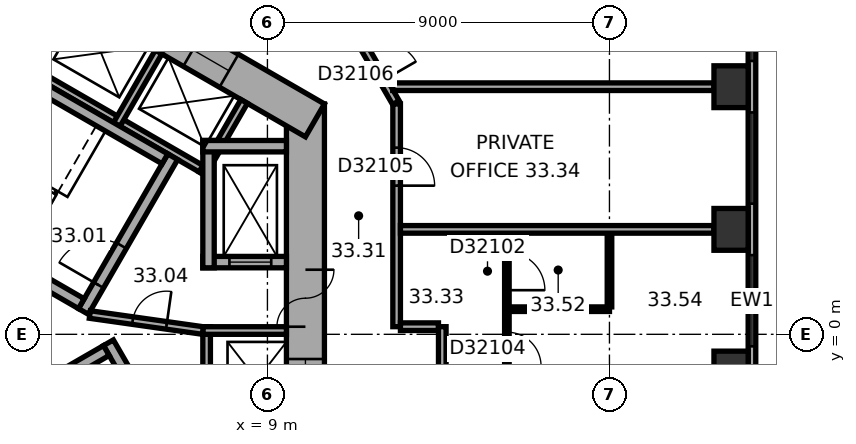
"""IFC4 building model, lengths in metres.
Left out: names, types, materials, properties, quantities, classifications, styles, units other than length and angle.
Written with IfcOpenShell. Run it as: python <this file> out.ifc"""

import sys

from ifc_helpers import new_model, si_unit, direction, frame, frame_2d, origin, origin_2d, place, context, subcontext, project, spatial, rectangle, extrude, element, fill, save


model = new_model("IFC4")
c1 = context("Model", 3, precision=1e-05, world=origin(), true_north=direction((0.0, 1.0)))
c2 = subcontext(c1, "Body", "Model", "MODEL_VIEW")
j1 = project(units=[si_unit("LENGTHUNIT", "METRE"), si_unit("PLANEANGLEUNIT", "RADIAN")], contexts=[c1])
p1 = place(None, origin())
s1 = spatial("IfcSite", under=j1, at=p1, CompositionType="ELEMENT")
p2 = place(p1, origin())
s2 = spatial("IfcBuilding", under=s1, at=p2, CompositionType="ELEMENT")
p3 = place(p2, frame((0.0, 0.0, 135.5)))
s3 = spatial("IfcBuildingStorey", under=s2, at=p3, CompositionType="ELEMENT", Elevation=135.5)
for number, where, z_axis, x_axis in (
    (1, (21.2, -0.993, 0.0), (0.0, 0.0, 1.0), (0.0, 1.0, 0.0)),
    (2, (21.2, 2.761, 0.0), (0.0, 0.0, 1.0), (0.0, 1.0, 0.0)),
    (3, (21.2, 6.515, 0.0), (0.0, 0.0, 1.0), (0.0, 1.0, 0.0)),
):
    element("IfcColumn", number, at=place(p3, frame(where, z_axis=z_axis, x_axis=x_axis)), inside=s3, PredefinedType="COLUMN", context=c2, shape_type="SweptSolid", body=[
        extrude(rectangle(XDim=1.1, YDim=0.9, at=origin_2d()), origin(), (0.0, 0.0, 1.0), 3.7),
    ])
p4 = place(p3, frame((10.0, -6.062, 0.0), z_axis=(0.0, 0.0, 1.0), x_axis=(0.0, 1.0, 0.0)))
e4 = element("IfcWall", 4, at=p4, inside=s3, PredefinedType="SHEAR", context=c2, shape_type="SweptSolid", body=[
    extrude(rectangle(XDim=12.125, YDim=1.0, at=frame_2d((6.062, 0.0))), origin(), (0.0, 0.0, 1.0), 3.7),
])
p5 = place(p4, frame((6.262, 0.0, 0.0)))
e5 = element("IfcOpeningElement", 5, at=p5, cuts=e4, PredefinedType="OPENING", context=c2, shape_type="SweptSolid", body=[
    extrude(rectangle(XDim=1.5, YDim=2.1, at=frame_2d((0.75, 1.05))), frame((0.0, 0.51, 0.0), z_axis=(0.0, -1.0, 0.0), x_axis=(1.0, 0.0, 0.0)), (0.0, 0.0, 1.0), 1.02),
])
p6 = place(p4, frame((1.712, 0.0, 0.0)))
e6 = element("IfcOpeningElement", 6, at=p6, cuts=e4, PredefinedType="OPENING", context=c2, shape_type="SweptSolid", body=[
    extrude(rectangle(XDim=1.1, YDim=2.1, at=frame_2d((0.55, 1.05))), frame((0.0, 0.51, 0.0), z_axis=(0.0, -1.0, 0.0), x_axis=(1.0, 0.0, 0.0)), (0.0, 0.0, 1.0), 1.02),
])
p7 = place(p4, frame((4.312, 0.0, 0.0)))
e7 = element("IfcOpeningElement", 7, at=p7, cuts=e4, PredefinedType="OPENING", context=c2, shape_type="SweptSolid", body=[
    extrude(rectangle(XDim=1.1, YDim=2.1, at=frame_2d((0.55, 1.05))), frame((0.0, 0.51, 0.0), z_axis=(0.0, -1.0, 0.0), x_axis=(1.0, 0.0, 0.0)), (0.0, 0.0, 1.0), 1.02),
])
p8 = place(p3, frame((10.25, 5.629, 0.0), z_axis=(0.0, 0.0, 1.0), x_axis=(-0.866022616891, 0.50000482701, 0.0)))
e8 = element("IfcWall", 8, at=p8, inside=s3, PredefinedType="SHEAR", context=c2, shape_type="SweptSolid", body=[
    extrude(rectangle(XDim=12.125, YDim=1.0, at=frame_2d((6.062, 0.0))), origin(), (0.0, 0.0, 1.0), 3.7),
])
p9 = place(p8, frame((2.612, 0.0, 0.0)))
e9 = element("IfcOpeningElement", 9, at=p9, cuts=e8, PredefinedType="OPENING", context=c2, shape_type="SweptSolid", body=[
    extrude(rectangle(XDim=1.1, YDim=2.1, at=frame_2d((0.55, 1.05))), frame((0.0, 0.51, 0.0), z_axis=(0.0, -1.0, 0.0), x_axis=(1.0, 0.0, 0.0)), (0.0, 0.0, 1.0), 1.02),
])
p10 = place(p8, frame((5.212, 0.0, 0.0)))
e10 = element("IfcOpeningElement", 10, at=p10, cuts=e8, PredefinedType="OPENING", context=c2, shape_type="SweptSolid", body=[
    extrude(rectangle(XDim=1.1, YDim=2.1, at=frame_2d((0.55, 1.05))), frame((0.0, 0.51, 0.0), z_axis=(0.0, -1.0, 0.0), x_axis=(1.0, 0.0, 0.0)), (0.0, 0.0, 1.0), 1.02),
])
p11 = place(p8, frame((7.812, 0.0, 0.0)))
e11 = element("IfcOpeningElement", 11, at=p11, cuts=e8, PredefinedType="OPENING", context=c2, shape_type="SweptSolid", body=[
    extrude(rectangle(XDim=1.1, YDim=2.1, at=frame_2d((0.55, 1.05))), frame((0.0, 0.51, 0.0), z_axis=(0.0, -1.0, 0.0), x_axis=(1.0, 0.0, 0.0)), (0.0, 0.0, 1.0), 1.02),
])
p12 = place(p3, frame((21.75, -9.138, 0.0), z_axis=(0.0, 0.0, 1.0), x_axis=(0.0, 1.0, 0.0)))
e12 = element("IfcWall", 12, at=p12, inside=s3, PredefinedType="STANDARD", context=c2, shape_type="SweptSolid", body=[
    extrude(rectangle(XDim=20.044, YDim=0.2, at=frame_2d((10.022, 0.0))), origin(), (0.0, 0.0, 1.0), 3.7),
])
p13 = place(p12, frame((1.314, 0.0, 0.9)))
e13 = element("IfcOpeningElement", 13, at=p13, cuts=e12, PredefinedType="OPENING", context=c2, shape_type="SweptSolid", body=[
    extrude(rectangle(XDim=2.4, YDim=2.0, at=frame_2d((1.2, 1.0))), frame((0.0, 0.11, 0.0), z_axis=(0.0, -1.0, 0.0), x_axis=(1.0, 0.0, 0.0)), (0.0, 0.0, 1.0), 0.22),
])
p14 = place(p12, frame((5.069, 0.0, 0.9)))
e14 = element("IfcOpeningElement", 14, at=p14, cuts=e12, PredefinedType="OPENING", context=c2, shape_type="SweptSolid", body=[
    extrude(rectangle(XDim=2.4, YDim=2.0, at=frame_2d((1.2, 1.0))), frame((0.0, 0.11, 0.0), z_axis=(0.0, -1.0, 0.0), x_axis=(1.0, 0.0, 0.0)), (0.0, 0.0, 1.0), 0.22),
])
p15 = place(p12, frame((8.823, 0.0, 0.9)))
e15 = element("IfcOpeningElement", 15, at=p15, cuts=e12, PredefinedType="OPENING", context=c2, shape_type="SweptSolid", body=[
    extrude(rectangle(XDim=2.4, YDim=2.0, at=frame_2d((1.2, 1.0))), frame((0.0, 0.11, 0.0), z_axis=(0.0, -1.0, 0.0), x_axis=(1.0, 0.0, 0.0)), (0.0, 0.0, 1.0), 0.22),
])
p16 = place(p12, frame((12.577, 0.0, 0.9)))
e16 = element("IfcOpeningElement", 16, at=p16, cuts=e12, PredefinedType="OPENING", context=c2, shape_type="SweptSolid", body=[
    extrude(rectangle(XDim=2.4, YDim=2.0, at=frame_2d((1.2, 1.0))), frame((0.0, 0.11, 0.0), z_axis=(0.0, -1.0, 0.0), x_axis=(1.0, 0.0, 0.0)), (0.0, 0.0, 1.0), 0.22),
])
p17 = place(p12, frame((16.331, 0.0, 0.9)))
e17 = element("IfcOpeningElement", 17, at=p17, cuts=e12, PredefinedType="OPENING", context=c2, shape_type="SweptSolid", body=[
    extrude(rectangle(XDim=2.4, YDim=2.0, at=frame_2d((1.2, 1.0))), frame((0.0, 0.11, 0.0), z_axis=(0.0, -1.0, 0.0), x_axis=(1.0, 0.0, 0.0)), (0.0, 0.0, 1.0), 0.22),
])
p18 = place(p3, frame((7.4, -5.2, 0.0), z_axis=(0.0, 0.0, 1.0), x_axis=(0.0, 1.0, 0.0)))
e18 = element("IfcWall", 18, at=p18, inside=s3, PredefinedType="PARTITIONING", context=c2, shape_type="SweptSolid", body=[
    extrude(rectangle(XDim=5.4, YDim=0.2, at=frame_2d((2.7, 0.0))), origin(), (0.0, 0.0, 1.0), 3.35),
])
p19 = place(p3, frame((7.3, 0.1, 0.0), z_axis=(0.0, 0.0, 1.0), x_axis=(1.0, 0.0, 0.0)))
e19 = element("IfcWall", 19, at=p19, inside=s3, PredefinedType="PARTITIONING", context=c2, shape_type="SweptSolid", body=[
    extrude(rectangle(XDim=2.2, YDim=0.2, at=frame_2d((1.1, 0.0))), origin(), (0.0, 0.0, 1.0), 3.35),
])
p20 = place(p3, frame((7.424, 4.259, 0.0), z_axis=(0.0, 0.0, 1.0), x_axis=(-0.866026010844, 0.49999894854, 0.0)))
e20 = element("IfcWall", 20, at=p20, inside=s3, PredefinedType="PARTITIONING", context=c2, shape_type="SweptSolid", body=[
    extrude(rectangle(XDim=8.0, YDim=0.2, at=frame_2d((4.0, 0.0))), origin(), (0.0, 0.0, 1.0), 3.35),
])
for number, where, z_axis, x_axis in (
    (21, (7.287, 4.222, 0.0), (0.0, 0.0, 1.0), (0.5, 0.866, 0.0)),
    (22, (5.036, 5.522, 0.0), (0.0, 0.0, 1.0), (0.5, 0.866, 0.0)),
    (23, (2.784, 6.822, 0.0), (0.0, 0.0, 1.0), (0.5, 0.866, 0.0)),
):
    element("IfcWall", number, at=place(p3, frame(where, z_axis=z_axis, x_axis=x_axis)), inside=s3, PredefinedType="PARTITIONING", context=c2, shape_type="SweptSolid", body=[
        extrude(rectangle(XDim=2.2, YDim=0.2, at=frame_2d((1.1, 0.0))), origin(), (0.0, 0.0, 1.0), 3.35),
    ])
p21 = place(p3, frame((4.158, 0.602, 0.0), z_axis=(0.0, 0.0, 1.0), x_axis=(0.499977259774, 0.866038532462, 0.0)))
e24 = element("IfcWall", 24, at=p21, inside=s3, PredefinedType="SHEAR", context=c2, shape_type="SweptSolid", body=[
    extrude(rectangle(XDim=4.7, YDim=0.3, at=frame_2d((2.35, 0.0))), origin(), (0.0, 0.0, 1.0), 3.35),
])
p22 = place(p21, frame((0.8, 0.0, 0.0)))
e25 = element("IfcOpeningElement", 25, at=p22, cuts=e24, PredefinedType="OPENING", context=c2, shape_type="SweptSolid", body=[
    extrude(rectangle(XDim=1.2, YDim=2.1, at=frame_2d((0.6, 1.05))), frame((0.0, 0.16, 0.0), z_axis=(0.0, -1.0, 0.0), x_axis=(1.0, 0.0, 0.0)), (0.0, 0.0, 1.0), 0.32),
])
for number, where, z_axis, x_axis in (
    (26, (4.103, 0.807, 0.0), (0.0, 0.0, 1.0), (-0.866, 0.5, 0.0)),
    (27, (6.303, 4.617, 0.0), (0.0, 0.0, 1.0), (-0.866, 0.5, 0.0)),
):
    element("IfcWall", number, at=place(p3, frame(where, z_axis=z_axis, x_axis=x_axis)), inside=s3, PredefinedType="SHEAR", context=c2, shape_type="SweptSolid", body=[
        extrude(rectangle(XDim=7.06, YDim=0.3, at=frame_2d((3.53, 0.0))), origin(), (0.0, 0.0, 1.0), 3.35),
    ])
p23 = place(p3, frame((4.816, -0.222, 0.0), z_axis=(0.0, 0.0, 1.0), x_axis=(0.499977259774, -0.866038532462, 0.0)))
e28 = element("IfcWall", 28, at=p23, inside=s3, PredefinedType="SHEAR", context=c2, shape_type="SweptSolid", body=[
    extrude(rectangle(XDim=4.7, YDim=0.3, at=frame_2d((2.35, 0.0))), origin(), (0.0, 0.0, 1.0), 3.35),
])
p24 = place(p3, frame((-1.353, -3.957, 0.0), z_axis=(0.0, 0.0, 1.0), x_axis=(0.866027801685, 0.499995846692, 0.0)))
e29 = element("IfcWall", 29, at=p24, inside=s3, PredefinedType="SHEAR", context=c2, shape_type="SweptSolid", body=[
    extrude(rectangle(XDim=7.06, YDim=0.3, at=frame_2d((3.53, 0.0))), origin(), (0.0, 0.0, 1.0), 3.35),
])
p25 = place(p3, frame((7.3, 1.9, 0.0), z_axis=(0.0, 0.0, 1.0), x_axis=(1.0, 0.0, 0.0)))
e30 = element("IfcWall", 30, at=p25, inside=s3, PredefinedType="SHEAR", context=c2, shape_type="SweptSolid", body=[
    extrude(rectangle(XDim=2.2, YDim=0.3, at=frame_2d((1.1, 0.0))), origin(), (0.0, 0.0, 1.0), 3.35),
])
p26 = place(p25, frame((0.7, 0.0, 0.0)))
e31 = element("IfcOpeningElement", 31, at=p26, cuts=e30, PredefinedType="OPENING", context=c2, shape_type="SweptSolid", body=[
    extrude(rectangle(XDim=1.1, YDim=2.1, at=frame_2d((0.55, 1.05))), frame((0.0, 0.16, 0.0), z_axis=(0.0, -1.0, 0.0), x_axis=(1.0, 0.0, 0.0)), (0.0, 0.0, 1.0), 0.32),
])
p27 = place(p3, frame((7.45, 1.75, 0.0), z_axis=(0.0, 0.0, 1.0), x_axis=(0.0, 1.0, 0.0)))
e32 = element("IfcWall", 32, at=p27, inside=s3, PredefinedType="SHEAR", context=c2, shape_type="SweptSolid", body=[
    extrude(rectangle(XDim=3.35, YDim=0.3, at=frame_2d((1.675, 0.0))), origin(), (0.0, 0.0, 1.0), 3.35),
])
p28 = place(p3, frame((7.3, 4.95, 0.0), z_axis=(0.0, 0.0, 1.0), x_axis=(1.0, 0.0, 0.0)))
e33 = element("IfcWall", 33, at=p28, inside=s3, PredefinedType="SHEAR", context=c2, shape_type="SweptSolid", body=[
    extrude(rectangle(XDim=2.2, YDim=0.3, at=frame_2d((1.1, 0.0))), origin(), (0.0, 0.0, 1.0), 3.35),
])
p29 = place(p3, frame((4.327, 0.521, 0.0), z_axis=(0.0, 0.0, 1.0), x_axis=(0.990124376366, -0.14019172346, 0.0)))
e34 = element("IfcWall", 34, at=p29, inside=s3, PredefinedType="PARTITIONING", context=c2, shape_type="SweptSolid", body=[
    extrude(rectangle(XDim=3.002, YDim=0.2, at=frame_2d((1.501, 0.0))), origin(), (0.0, 0.0, 1.0), 3.35),
])
p30 = place(p29, frame((1.138, 0.0, 0.0)))
e35 = element("IfcOpeningElement", 35, at=p30, cuts=e34, PredefinedType="OPENING", context=c2, shape_type="SweptSolid", body=[
    extrude(rectangle(XDim=0.9, YDim=2.1, at=frame_2d((0.45, 1.05))), frame((0.0, 0.11, 0.0), z_axis=(0.0, -1.0, 0.0), x_axis=(1.0, 0.0, 0.0)), (0.0, 0.0, 1.0), 0.22),
])
p31 = place(p3, frame((12.38, 6.097, 0.0), z_axis=(0.0, 0.0, 1.0), x_axis=(-0.499964847546, 0.866045698112, 0.0)))
e36 = element("IfcWall", 36, at=p31, inside=s3, PredefinedType="PARTITIONING", context=c2, shape_type="SweptSolid", body=[
    extrude(rectangle(XDim=1.86, YDim=0.2, at=frame_2d((0.93, 0.0))), origin(), (0.0, 0.0, 1.0), 3.35),
])
p32 = place(p31, frame((0.672, 0.0, 0.0)))
e37 = element("IfcOpeningElement", 37, at=p32, cuts=e36, PredefinedType="OPENING", context=c2, shape_type="SweptSolid", body=[
    extrude(rectangle(XDim=1.0, YDim=2.1, at=frame_2d((0.5, 1.05))), frame((0.0, 0.11, 0.0), z_axis=(0.0, -1.0, 0.0), x_axis=(1.0, 0.0, 0.0)), (0.0, 0.0, 1.0), 0.22),
])
p33 = place(p3, frame((12.4, 0.201, 0.0), z_axis=(0.0, 0.0, 1.0), x_axis=(0.0, 1.0, 0.0)))
e38 = element("IfcWall", 38, at=p33, inside=s3, PredefinedType="PARTITIONING", context=c2, shape_type="SweptSolid", body=[
    extrude(rectangle(XDim=5.861, YDim=0.2, at=frame_2d((2.931, 0.0))), origin(), (0.0, 0.0, 1.0), 3.35),
])
p34 = place(p33, frame((3.711, 0.0, 0.0)))
e39 = element("IfcOpeningElement", 39, at=p34, cuts=e38, PredefinedType="OPENING", context=c2, shape_type="SweptSolid", body=[
    extrude(rectangle(XDim=1.0, YDim=2.1, at=frame_2d((0.5, 1.05))), frame((0.0, 0.11, 0.0), z_axis=(0.0, -1.0, 0.0), x_axis=(1.0, 0.0, 0.0)), (0.0, 0.0, 1.0), 0.22),
])
p35 = place(p3, frame((13.501, 0.201, 0.0), z_axis=(0.0, 0.0, 1.0), x_axis=(-1.0, 0.0, 0.0)))
e40 = element("IfcWall", 40, at=p35, inside=s3, PredefinedType="PARTITIONING", context=c2, shape_type="SweptSolid", body=[
    extrude(rectangle(XDim=1.001, YDim=0.2, at=frame_2d((0.5, 0.0))), origin(), (0.0, 0.0, 1.0), 3.35),
])
p36 = place(p3, frame((13.601, -5.501, 0.0), z_axis=(0.0, 0.0, 1.0), x_axis=(0.0, 1.0, 0.0)))
e41 = element("IfcWall", 41, at=p36, inside=s3, PredefinedType="PARTITIONING", context=c2, shape_type="SweptSolid", body=[
    extrude(rectangle(XDim=5.702, YDim=0.2, at=frame_2d((2.851, 0.0))), origin(), (0.0, 0.0, 1.0), 3.35),
])
p37 = place(p36, frame((2.728, 0.0, 0.0)))
e42 = element("IfcOpeningElement", 42, at=p37, cuts=e41, PredefinedType="OPENING", context=c2, shape_type="SweptSolid", body=[
    extrude(rectangle(XDim=1.0, YDim=2.1, at=frame_2d((0.5, 1.05))), frame((0.0, 0.11, 0.0), z_axis=(0.0, -1.0, 0.0), x_axis=(1.0, 0.0, 0.0)), (0.0, 0.0, 1.0), 0.22),
])
p38 = place(p3, frame((15.301, -4.647, 0.0), z_axis=(0.0, 0.0, 1.0), x_axis=(0.0, 1.0, 0.0)))
e43 = element("IfcWall", 43, at=p38, inside=s3, PredefinedType="PARTITIONING", context=c2, shape_type="SweptSolid", body=[
    extrude(rectangle(XDim=7.308, YDim=0.12, at=frame_2d((3.654, 0.0))), origin(), (0.0, 0.0, 1.0), 3.35),
])
p39 = place(p38, frame((5.808, 0.0, 0.0)))
e44 = element("IfcOpeningElement", 44, at=p39, cuts=e43, PredefinedType="OPENING", context=c2, shape_type="SweptSolid", body=[
    extrude(rectangle(XDim=1.0, YDim=2.1, at=frame_2d((0.5, 1.05))), frame((0.0, 0.07, 0.0), z_axis=(0.0, -1.0, 0.0), x_axis=(1.0, 0.0, 0.0)), (0.0, 0.0, 1.0), 0.14),
])
p40 = place(p38, frame((1.15, 0.0, 0.0)))
e45 = element("IfcOpeningElement", 45, at=p40, cuts=e43, PredefinedType="OPENING", context=c2, shape_type="SweptSolid", body=[
    extrude(rectangle(XDim=0.9, YDim=2.1, at=frame_2d((0.45, 1.05))), frame((0.0, 0.07, 0.0), z_axis=(0.0, -1.0, 0.0), x_axis=(1.0, 0.0, 0.0)), (0.0, 0.0, 1.0), 0.14),
])
p41 = place(p38, frame((3.804, 0.0, 0.0)))
e46 = element("IfcOpeningElement", 46, at=p41, cuts=e43, PredefinedType="OPENING", context=c2, shape_type="SweptSolid", body=[
    extrude(rectangle(XDim=0.9, YDim=2.1, at=frame_2d((0.45, 1.05))), frame((0.0, 0.07, 0.0), z_axis=(0.0, -1.0, 0.0), x_axis=(1.0, 0.0, 0.0)), (0.0, 0.0, 1.0), 0.14),
])
p42 = place(p3, frame((15.361, 0.661, 0.0), z_axis=(0.0, 0.0, 1.0), x_axis=(1.0, 0.0, 0.0)))
e47 = element("IfcWall", 47, at=p42, inside=s3, PredefinedType="PARTITIONING", context=c2, shape_type="SweptSolid", body=[
    extrude(rectangle(XDim=2.64, YDim=0.12, at=frame_2d((1.32, 0.0))), origin(), (0.0, 0.0, 1.0), 3.35),
])
p43 = place(p3, frame((18.001, 0.721, 0.0), z_axis=(0.0, 0.0, 1.0), x_axis=(0.0, 1.0, 0.0)))
e48 = element("IfcWall", 48, at=p43, inside=s3, PredefinedType="PARTITIONING", context=c2, shape_type="SweptSolid", body=[
    extrude(rectangle(XDim=1.94, YDim=0.12, at=frame_2d((0.97, 0.0))), origin(), (0.0, 0.0, 1.0), 3.35),
])
p44 = place(p3, frame((20.75, 2.761, 0.0), z_axis=(0.0, 0.0, 1.0), x_axis=(-1.0, 0.0, 0.0)))
e49 = element("IfcWall", 49, at=p44, inside=s3, PredefinedType="PARTITIONING", context=c2, shape_type="SweptSolid", body=[
    extrude(rectangle(XDim=8.25, YDim=0.2, at=frame_2d((4.125, 0.0))), origin(), (0.0, 0.0, 1.0), 3.35),
])
p45 = place(p3, frame((20.75, 6.515, 0.0), z_axis=(0.0, 0.0, 1.0), x_axis=(-1.0, 0.0, 0.0)))
e50 = element("IfcWall", 50, at=p45, inside=s3, PredefinedType="PARTITIONING", context=c2, shape_type="SweptSolid", body=[
    extrude(rectangle(XDim=8.452, YDim=0.2, at=frame_2d((4.226, 0.0))), origin(), (0.0, 0.0, 1.0), 3.35),
])
p46 = place(p15, origin())
e51 = element("IfcWindow", 51, at=p46, inside=s3, PartitioningType="SINGLE_PANEL", PredefinedType="WINDOW", context=c2, shape_type="SweptSolid", body=[
    extrude(rectangle(XDim=2.4, YDim=2.0, at=frame_2d((1.2, 1.0))), frame((0.0, 0.03, 0.0), z_axis=(0.0, -1.0, 0.0), x_axis=(1.0, 0.0, 0.0)), (0.0, 0.0, 1.0), 0.06),
])
fill(e15, e51)
p47 = place(p16, origin())
e52 = element("IfcWindow", 52, at=p47, inside=s3, PartitioningType="SINGLE_PANEL", PredefinedType="WINDOW", context=c2, shape_type="SweptSolid", body=[
    extrude(rectangle(XDim=2.4, YDim=2.0, at=frame_2d((1.2, 1.0))), frame((0.0, 0.03, 0.0), z_axis=(0.0, -1.0, 0.0), x_axis=(1.0, 0.0, 0.0)), (0.0, 0.0, 1.0), 0.06),
])
fill(e16, e52)
p48 = place(p17, origin())
e53 = element("IfcWindow", 53, at=p48, inside=s3, PartitioningType="SINGLE_PANEL", PredefinedType="WINDOW", context=c2, shape_type="SweptSolid", body=[
    extrude(rectangle(XDim=2.4, YDim=2.0, at=frame_2d((1.2, 1.0))), frame((0.0, 0.03, 0.0), z_axis=(0.0, -1.0, 0.0), x_axis=(1.0, 0.0, 0.0)), (0.0, 0.0, 1.0), 0.06),
])
fill(e17, e53)
p49 = place(p5, origin())
e54 = element("IfcDoor", 54, at=p49, inside=s3, OperationType="DOUBLE_DOOR_SINGLE_SWING", PredefinedType="DOOR", context=c2, shape_type="SweptSolid", body=[
    extrude(rectangle(XDim=1.5, YDim=2.1, at=frame_2d((0.75, 1.05))), frame((0.0, 0.025, 0.0), z_axis=(0.0, -1.0, 0.0), x_axis=(1.0, 0.0, 0.0)), (0.0, 0.0, 1.0), 0.05),
])
fill(e5, e54)
p50 = place(p22, origin())
e55 = element("IfcDoor", 55, at=p50, inside=s3, OperationType="SINGLE_SWING_RIGHT", PredefinedType="DOOR", context=c2, shape_type="SweptSolid", body=[
    extrude(rectangle(XDim=1.2, YDim=2.1, at=frame_2d((0.6, 1.05))), frame((0.0, 0.025, 0.0), z_axis=(0.0, -1.0, 0.0), x_axis=(1.0, 0.0, 0.0)), (0.0, 0.0, 1.0), 0.05),
])
fill(e25, e55)
p51 = place(p30, origin())
e56 = element("IfcDoor", 56, at=p51, inside=s3, OperationType="SINGLE_SWING_LEFT", PredefinedType="DOOR", context=c2, shape_type="SweptSolid", body=[
    extrude(rectangle(XDim=0.9, YDim=2.1, at=frame_2d((0.45, 1.05))), frame((0.0, 0.025, 0.0), z_axis=(0.0, -1.0, 0.0), x_axis=(1.0, 0.0, 0.0)), (0.0, 0.0, 1.0), 0.05),
])
fill(e35, e56)
p52 = place(p26, origin())
e57 = element("IfcDoor", 57, at=p52, inside=s3, OperationType="DOUBLE_DOOR_SLIDING", PredefinedType="DOOR", context=c2, shape_type="SweptSolid", body=[
    extrude(rectangle(XDim=1.1, YDim=2.1, at=frame_2d((0.55, 1.05))), frame((0.0, 0.025, 0.0), z_axis=(0.0, -1.0, 0.0), x_axis=(1.0, 0.0, 0.0)), (0.0, 0.0, 1.0), 0.05),
])
fill(e31, e57)
p53 = place(p7, origin())
e58 = element("IfcDoor", 58, at=p53, inside=s3, OperationType="DOUBLE_DOOR_SLIDING", PredefinedType="DOOR", context=c2, shape_type="SweptSolid", body=[
    extrude(rectangle(XDim=1.1, YDim=2.1, at=frame_2d((0.55, 1.05))), frame((0.0, 0.025, 0.0), z_axis=(0.0, -1.0, 0.0), x_axis=(1.0, 0.0, 0.0)), (0.0, 0.0, 1.0), 0.05),
])
fill(e7, e58)
p54 = place(p9, origin())
e59 = element("IfcDoor", 59, at=p54, inside=s3, OperationType="DOUBLE_DOOR_SLIDING", PredefinedType="DOOR", context=c2, shape_type="SweptSolid", body=[
    extrude(rectangle(XDim=1.1, YDim=2.1, at=frame_2d((0.55, 1.05))), frame((0.0, 0.025, 0.0), z_axis=(0.0, -1.0, 0.0), x_axis=(1.0, 0.0, 0.0)), (0.0, 0.0, 1.0), 0.05),
])
fill(e9, e59)
p55 = place(p39, origin())
e60 = element("IfcDoor", 60, at=p55, inside=s3, OperationType="SINGLE_SWING_LEFT", PredefinedType="DOOR", context=c2, shape_type="SweptSolid", body=[
    extrude(rectangle(XDim=1.0, YDim=2.1, at=frame_2d((0.5, 1.05))), frame((0.0, 0.025, 0.0), z_axis=(0.0, -1.0, 0.0), x_axis=(1.0, 0.0, 0.0)), (0.0, 0.0, 1.0), 0.05),
])
fill(e44, e60)
p56 = place(p41, origin())
e61 = element("IfcDoor", 61, at=p56, inside=s3, OperationType="SINGLE_SWING_LEFT", PredefinedType="DOOR", context=c2, shape_type="SweptSolid", body=[
    extrude(rectangle(XDim=0.9, YDim=2.1, at=frame_2d((0.45, 1.05))), frame((0.0, 0.025, 0.0), z_axis=(0.0, -1.0, 0.0), x_axis=(1.0, 0.0, 0.0)), (0.0, 0.0, 1.0), 0.05),
])
fill(e46, e61)
p57 = place(p34, origin())
e62 = element("IfcDoor", 62, at=p57, inside=s3, OperationType="SINGLE_SWING_LEFT", PredefinedType="DOOR", context=c2, shape_type="SweptSolid", body=[
    extrude(rectangle(XDim=1.0, YDim=2.1, at=frame_2d((0.5, 1.05))), frame((0.0, 0.025, 0.0), z_axis=(0.0, -1.0, 0.0), x_axis=(1.0, 0.0, 0.0)), (0.0, 0.0, 1.0), 0.05),
])
fill(e39, e62)
p58 = place(p32, origin())
e63 = element("IfcDoor", 63, at=p58, inside=s3, OperationType="SINGLE_SWING_LEFT", PredefinedType="DOOR", context=c2, shape_type="SweptSolid", body=[
    extrude(rectangle(XDim=1.0, YDim=2.1, at=frame_2d((0.5, 1.05))), frame((0.0, 0.025, 0.0), z_axis=(0.0, -1.0, 0.0), x_axis=(1.0, 0.0, 0.0)), (0.0, 0.0, 1.0), 0.05),
])
fill(e37, e63)
save(model, sys.argv[1])
